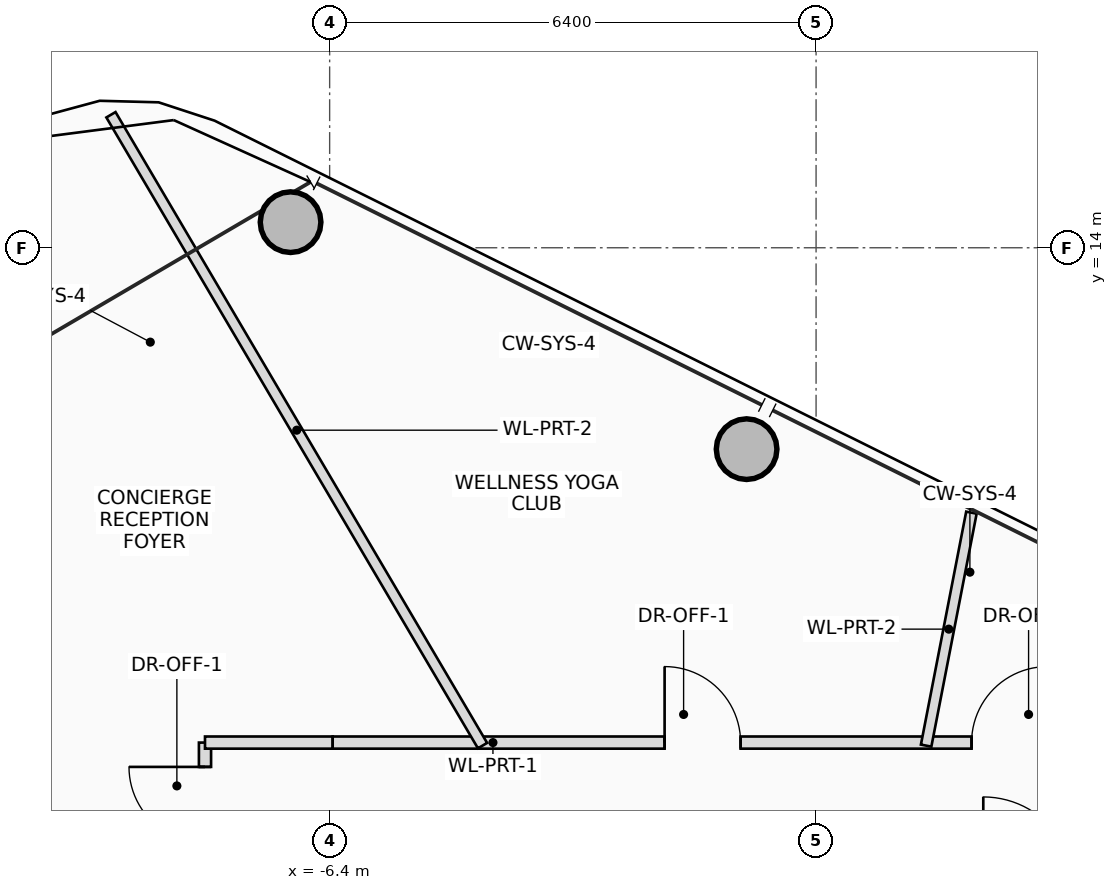
"""IFC4 building model, lengths in metres.
Left out: names, types, materials, properties, quantities, classifications, styles, units other than length and angle.
Written with IfcOpenShell. Run it as: python <this file> out.ifc"""

import sys

from ifc_helpers import new_model, si_unit, direction, frame, frame_2d, origin, origin_2d, place, context, subcontext, project, spatial, rectangle, hollow_circle, extrude, source, transform, mapped, element, fill, save


model = new_model("IFC4")
c1 = context("Model", 3, precision=1e-05, world=origin(), true_north=direction((0.0, 1.0)))
c2 = subcontext(c1, "Body", "Model", "MODEL_VIEW")
j1 = project(units=[si_unit("LENGTHUNIT", "METRE"), si_unit("PLANEANGLEUNIT", "RADIAN")], contexts=[c1])
p1 = place(None, origin())
s1 = spatial("IfcSite", under=j1, at=p1, CompositionType="ELEMENT")
p2 = place(p1, origin())
s2 = spatial("IfcBuilding", under=s1, at=p2, CompositionType="ELEMENT")
p3 = place(p2, frame((0.0, 0.0, 310.55)))
s3 = spatial("IfcBuildingStorey", under=s2, at=p3, CompositionType="ELEMENT", Elevation=310.55)
m1 = source(origin(), c2, "Body", "SweptSolid", [
    extrude(hollow_circle(Radius=0.4, WallThickness=0.028, at=origin_2d()), origin(), (0.0, 0.0, 1.0), 3.45),
])
for number, where, z_axis, x_axis in (
    (1, (-0.914, 11.35, 0.0), (0.0, 0.0, 1.0), (1.0, 0.0, 0.0)),
    (2, (-6.914, 14.337, 0.0), (0.0, 0.0, 1.0), (1.0, 0.0, 0.0)),
):
    element("IfcColumn", number, at=place(p3, frame(where, z_axis=z_axis, x_axis=x_axis)), inside=s3, PredefinedType="COLUMN", context=c2, shape_type="MappedRepresentation", body=[
        mapped(m1, transform((0.0, 0.0, 0.0), scale=1.0)),
    ])
p4 = place(p3, frame((-8.04, 5.85, 0.0), z_axis=(0.0, 0.0, 1.0), x_axis=(0.0, 1.0, 0.0)))
e3 = element("IfcWall", 3, at=p4, inside=s3, PredefinedType="PARTITIONING", context=c2, shape_type="SweptSolid", body=[
    extrude(rectangle(XDim=1.64, YDim=0.16, at=frame_2d((0.82, 0.0))), origin(), (0.0, 0.0, 1.0), 2.905),
])
p5 = place(p4, frame((0.32, 0.0, 0.0)))
e4 = element("IfcOpeningElement", 4, at=p5, cuts=e3, PredefinedType="OPENING", context=c2, shape_type="SweptSolid", body=[
    extrude(rectangle(XDim=1.0, YDim=2.25, at=frame_2d((0.5, 1.125))), frame((0.0, 0.09, 0.0), z_axis=(0.0, -1.0, 0.0), x_axis=(1.0, 0.0, 0.0)), (0.0, 0.0, 1.0), 0.18),
])
p6 = place(p3, frame((-8.04, 7.49, 0.0), z_axis=(0.0, 0.0, 1.0), x_axis=(1.0, 0.0, 0.0)))
e5 = element("IfcWall", 5, at=p6, inside=s3, PredefinedType="PARTITIONING", context=c2, shape_type="SweptSolid", body=[
    extrude(rectangle(XDim=1.68, YDim=0.16, at=frame_2d((0.84, 0.0))), origin(), (0.0, 0.0, 1.0), 2.655),
])
p7 = place(p3, frame((-6.36, 7.49, 0.0), z_axis=(0.0, 0.0, 1.0), x_axis=(1.0, 0.0, 0.0)))
e6 = element("IfcWall", 6, at=p7, inside=s3, PredefinedType="PARTITIONING", context=c2, shape_type="SweptSolid", body=[
    extrude(rectangle(XDim=9.679, YDim=0.16, at=frame_2d((4.84, 0.0))), origin(), (0.0, 0.0, 1.0), 2.655),
])
p8 = place(p7, frame((4.367, 0.0, 0.0)))
e7 = element("IfcOpeningElement", 7, at=p8, cuts=e6, PredefinedType="OPENING", context=c2, shape_type="SweptSolid", body=[
    extrude(rectangle(XDim=1.0, YDim=2.25, at=frame_2d((0.5, 1.125))), frame((0.0, 0.09, 0.0), z_axis=(0.0, -1.0, 0.0), x_axis=(1.0, 0.0, 0.0)), (0.0, 0.0, 1.0), 0.18),
])
p9 = place(p7, frame((8.406, 0.0, 0.0)))
e8 = element("IfcOpeningElement", 8, at=p9, cuts=e6, PredefinedType="OPENING", context=c2, shape_type="SweptSolid", body=[
    extrude(rectangle(XDim=1.0, YDim=2.25, at=frame_2d((0.5, 1.125))), frame((0.0, 0.09, 0.0), z_axis=(0.0, -1.0, 0.0), x_axis=(1.0, 0.0, 0.0)), (0.0, 0.0, 1.0), 0.18),
])
p10 = place(p3, frame((1.448, 7.45, 0.0), z_axis=(0.0, 0.0, 1.0), x_axis=(0.190865473384, 0.981616203549, 0.0)))
e9 = element("IfcWall", 9, at=p10, inside=s3, PredefinedType="PARTITIONING", context=c2, shape_type="SweptSolid", body=[
    extrude(rectangle(XDim=3.122, YDim=0.14, at=frame_2d((1.561, 0.0))), origin(), (0.0, 0.0, 1.0), 2.815),
])
p11 = place(p3, frame((-4.388, 7.45, 0.0), z_axis=(0.0, 0.0, 1.0), x_axis=(-0.507535081803, 0.861631093183, 0.0)))
e10 = element("IfcWall", 10, at=p11, inside=s3, PredefinedType="PARTITIONING", context=c2, shape_type="SweptSolid", body=[
    extrude(rectangle(XDim=9.633, YDim=0.14, at=frame_2d((4.816, 0.0))), origin(), (0.0, 0.0, 1.0), 2.655),
])
p12 = place(p5, origin())
e11 = element("IfcDoor", 11, at=p12, inside=s3, OperationType="SINGLE_SWING_RIGHT", PredefinedType="DOOR", context=c2, shape_type="SweptSolid", body=[
    extrude(rectangle(XDim=1.0, YDim=2.25, at=frame_2d((0.5, 1.125))), frame((0.0, 0.025, 0.0), z_axis=(0.0, -1.0, 0.0), x_axis=(1.0, 0.0, 0.0)), (0.0, 0.0, 1.0), 0.05),
])
fill(e4, e11)
p13 = place(p8, origin())
e12 = element("IfcDoor", 12, at=p13, inside=s3, OperationType="SINGLE_SWING_LEFT", PredefinedType="DOOR", context=c2, shape_type="SweptSolid", body=[
    extrude(rectangle(XDim=1.0, YDim=2.25, at=frame_2d((0.5, 1.125))), frame((0.0, 0.025, 0.0), z_axis=(0.0, -1.0, 0.0), x_axis=(1.0, 0.0, 0.0)), (0.0, 0.0, 1.0), 0.05),
])
fill(e7, e12)
p14 = place(p9, origin())
e13 = element("IfcDoor", 13, at=p14, inside=s3, OperationType="SINGLE_SWING_RIGHT", PredefinedType="DOOR", context=c2, shape_type="SweptSolid", body=[
    extrude(rectangle(XDim=1.0, YDim=2.25, at=frame_2d((0.5, 1.125))), frame((0.0, 0.025, 0.0), z_axis=(0.0, -1.0, 0.0), x_axis=(1.0, 0.0, 0.0)), (0.0, 0.0, 1.0), 0.05),
])
fill(e8, e13)
save(model, sys.argv[1])
